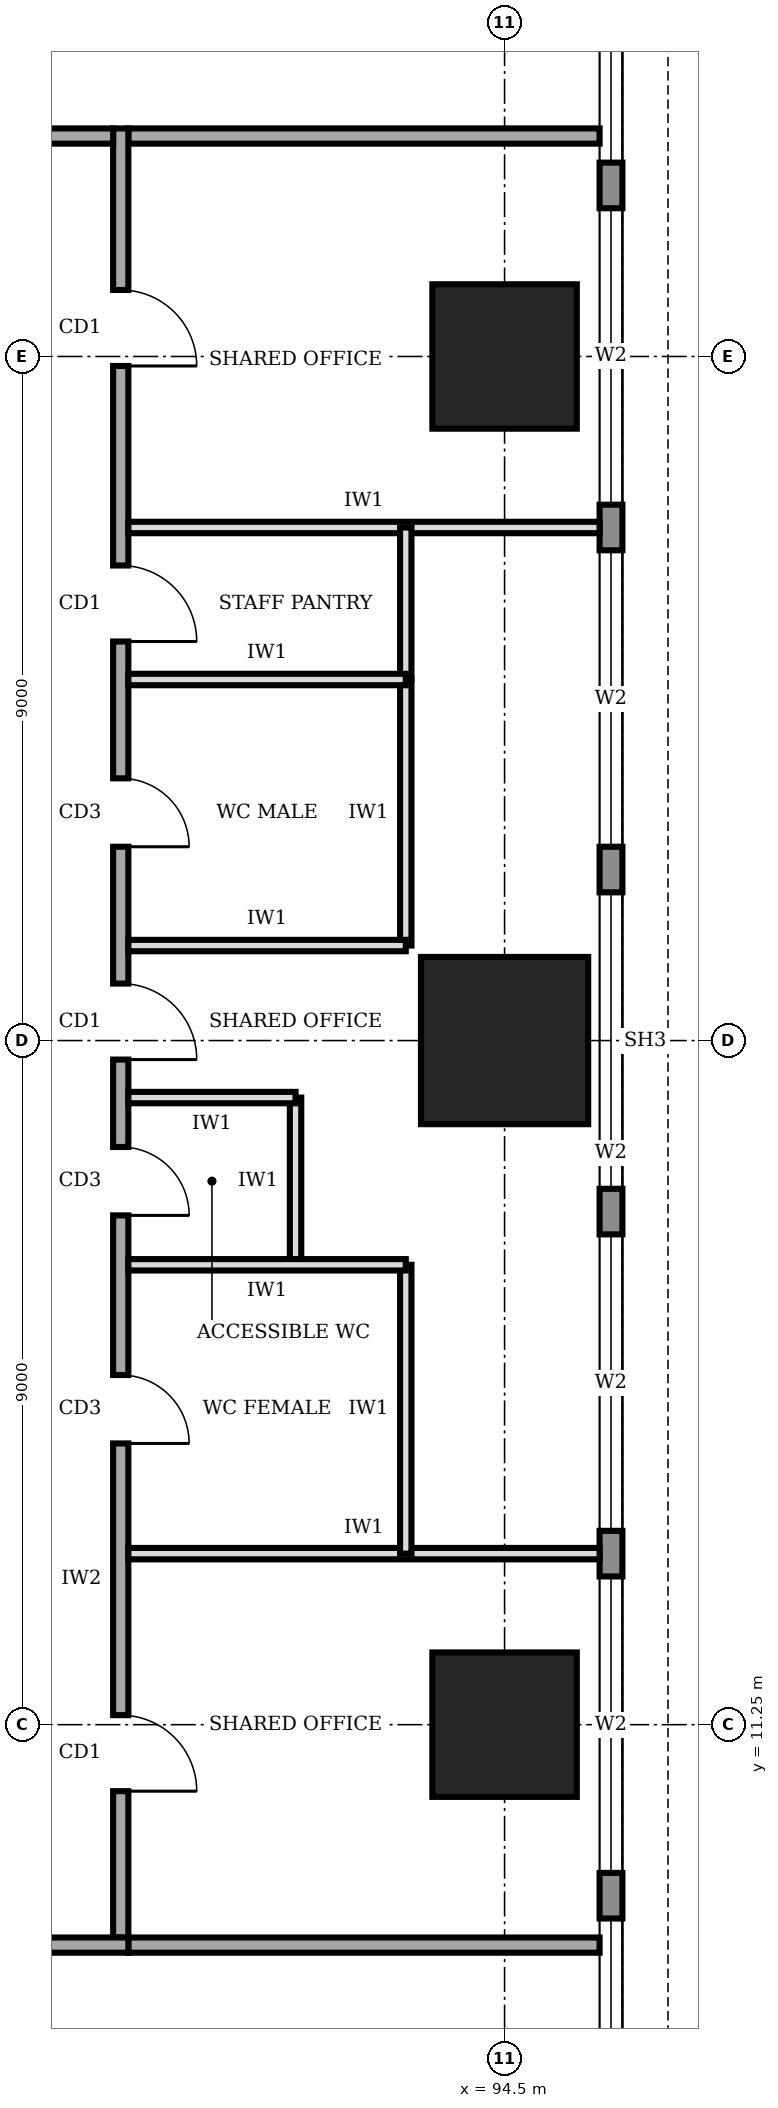
"""IFC4 building model, lengths in metres.
Left out: names, types, materials, properties, quantities, classifications, styles, units other than length and angle.
Written with IfcOpenShell. Run it as: python <this file> out.ifc"""

import sys

from ifc_helpers import new_model, si_unit, direction, frame, frame_2d, origin, origin_2d, place, context, subcontext, project, spatial, rectangle, extrude, element, fill, save


model = new_model("IFC4")
c1 = context("Model", 3, precision=1e-05, world=origin(), true_north=direction((0.0, 1.0)))
c2 = subcontext(c1, "Body", "Model", "MODEL_VIEW")
j1 = project(units=[si_unit("LENGTHUNIT", "METRE"), si_unit("PLANEANGLEUNIT", "RADIAN")], contexts=[c1])
p1 = place(None, origin())
s1 = spatial("IfcSite", under=j1, at=p1, CompositionType="ELEMENT")
p2 = place(p1, origin())
s2 = spatial("IfcBuilding", under=s1, at=p2, CompositionType="ELEMENT")
p3 = place(p2, frame((0.0, 0.0, 157.0)))
s3 = spatial("IfcBuildingStorey", under=s2, at=p3, CompositionType="ELEMENT", Elevation=157.0)
p4 = place(p3, frame((94.5, 11.25, 0.0), z_axis=(0.0, 0.0, 1.0), x_axis=(1.0, 0.0, 0.0)))
e1 = element("IfcColumn", 1, at=p4, inside=s3, PredefinedType="COLUMN", context=c2, shape_type="SweptSolid", body=[
    extrude(rectangle(XDim=1.9, YDim=1.9, at=origin_2d()), origin(), (0.0, 0.0, 1.0), 4.0),
])
p5 = place(p3, frame((94.5, 20.25, 0.0), z_axis=(0.0, 0.0, 1.0), x_axis=(1.0, 0.0, 0.0)))
e2 = element("IfcColumn", 2, at=p5, inside=s3, PredefinedType="COLUMN", context=c2, shape_type="SweptSolid", body=[
    extrude(rectangle(XDim=2.2, YDim=2.2, at=origin_2d()), origin(), (0.0, 0.0, 1.0), 4.0),
])
p6 = place(p3, frame((94.5, 29.25, 0.0), z_axis=(0.0, 0.0, 1.0), x_axis=(1.0, 0.0, 0.0)))
e3 = element("IfcColumn", 3, at=p6, inside=s3, PredefinedType="COLUMN", context=c2, shape_type="SweptSolid", body=[
    extrude(rectangle(XDim=1.9, YDim=1.9, at=origin_2d()), origin(), (0.0, 0.0, 1.0), 4.0),
])
p7 = place(p3, frame((95.9, 3.32, 0.0), z_axis=(0.0, 0.0, 1.0), x_axis=(0.0, 1.0, 0.0)))
e4 = element("IfcWall", 4, at=p7, inside=s3, PredefinedType="STANDARD", context=c2, shape_type="SweptSolid", body=[
    extrude(rectangle(XDim=33.86, YDim=0.3, at=frame_2d((16.93, 0.0))), origin(), (0.0, 0.0, 1.0), 3.75),
])
p8 = place(p7, frame((1.48, 0.0, 0.6)))
e5 = element("IfcOpeningElement", 5, at=p8, cuts=e4, PredefinedType="OPENING", context=c2, shape_type="SweptSolid", body=[
    extrude(rectangle(XDim=3.9, YDim=2.6, at=frame_2d((1.95, 1.3))), frame((0.0, 0.16, 0.0), z_axis=(0.0, -1.0, 0.0), x_axis=(1.0, 0.0, 0.0)), (0.0, 0.0, 1.0), 0.32),
])
p9 = place(p7, frame((5.98, 0.0, 0.6)))
e6 = element("IfcOpeningElement", 6, at=p9, cuts=e4, PredefinedType="OPENING", context=c2, shape_type="SweptSolid", body=[
    extrude(rectangle(XDim=3.9, YDim=2.6, at=frame_2d((1.95, 1.3))), frame((0.0, 0.16, 0.0), z_axis=(0.0, -1.0, 0.0), x_axis=(1.0, 0.0, 0.0)), (0.0, 0.0, 1.0), 0.32),
])
p10 = place(p7, frame((10.48, 0.0, 0.6)))
e7 = element("IfcOpeningElement", 7, at=p10, cuts=e4, PredefinedType="OPENING", context=c2, shape_type="SweptSolid", body=[
    extrude(rectangle(XDim=3.9, YDim=2.6, at=frame_2d((1.95, 1.3))), frame((0.0, 0.16, 0.0), z_axis=(0.0, -1.0, 0.0), x_axis=(1.0, 0.0, 0.0)), (0.0, 0.0, 1.0), 0.32),
])
p11 = place(p7, frame((14.98, 0.0, 0.6)))
e8 = element("IfcOpeningElement", 8, at=p11, cuts=e4, PredefinedType="OPENING", context=c2, shape_type="SweptSolid", body=[
    extrude(rectangle(XDim=3.9, YDim=2.6, at=frame_2d((1.95, 1.3))), frame((0.0, 0.16, 0.0), z_axis=(0.0, -1.0, 0.0), x_axis=(1.0, 0.0, 0.0)), (0.0, 0.0, 1.0), 0.32),
])
p12 = place(p7, frame((19.48, 0.0, 0.6)))
e9 = element("IfcOpeningElement", 9, at=p12, cuts=e4, PredefinedType="OPENING", context=c2, shape_type="SweptSolid", body=[
    extrude(rectangle(XDim=3.9, YDim=2.6, at=frame_2d((1.95, 1.3))), frame((0.0, 0.16, 0.0), z_axis=(0.0, -1.0, 0.0), x_axis=(1.0, 0.0, 0.0)), (0.0, 0.0, 1.0), 0.32),
])
p13 = place(p7, frame((23.98, 0.0, 0.6)))
e10 = element("IfcOpeningElement", 10, at=p13, cuts=e4, PredefinedType="OPENING", context=c2, shape_type="SweptSolid", body=[
    extrude(rectangle(XDim=3.9, YDim=2.6, at=frame_2d((1.95, 1.3))), frame((0.0, 0.16, 0.0), z_axis=(0.0, -1.0, 0.0), x_axis=(1.0, 0.0, 0.0)), (0.0, 0.0, 1.0), 0.32),
])
p14 = place(p7, frame((28.48, 0.0, 0.6)))
e11 = element("IfcOpeningElement", 11, at=p14, cuts=e4, PredefinedType="OPENING", context=c2, shape_type="SweptSolid", body=[
    extrude(rectangle(XDim=3.9, YDim=2.6, at=frame_2d((1.95, 1.3))), frame((0.0, 0.16, 0.0), z_axis=(0.0, -1.0, 0.0), x_axis=(1.0, 0.0, 0.0)), (0.0, 0.0, 1.0), 0.32),
])
p15 = place(p3, frame((63.3, 8.35, 0.0), z_axis=(0.0, 0.0, 1.0), x_axis=(1.0, 0.0, 0.0)))
e12 = element("IfcWall", 12, at=p15, inside=s3, PredefinedType="SOLIDWALL", context=c2, shape_type="SweptSolid", body=[
    extrude(rectangle(XDim=26.25, YDim=0.2, at=frame_2d((13.125, 0.0))), origin(), (0.0, 0.0, 1.0), 3.75),
])
p16 = place(p15, frame((6.0, 0.0, 0.0)))
e13 = element("IfcOpeningElement", 13, at=p16, cuts=e12, PredefinedType="OPENING", context=c2, shape_type="SweptSolid", body=[
    extrude(rectangle(XDim=1.0, YDim=2.1, at=frame_2d((0.5, 1.05))), frame((0.0, 0.11, 0.0), z_axis=(0.0, -1.0, 0.0), x_axis=(1.0, 0.0, 0.0)), (0.0, 0.0, 1.0), 0.22),
])
p17 = place(p15, frame((19.325, 0.0, 0.0)))
e14 = element("IfcOpeningElement", 14, at=p17, cuts=e12, PredefinedType="OPENING", context=c2, shape_type="SweptSolid", body=[
    extrude(rectangle(XDim=1.0, YDim=2.1, at=frame_2d((0.5, 1.05))), frame((0.0, 0.11, 0.0), z_axis=(0.0, -1.0, 0.0), x_axis=(1.0, 0.0, 0.0)), (0.0, 0.0, 1.0), 0.22),
])
p18 = place(p3, frame((89.45, 8.45, 0.0), z_axis=(0.0, 0.0, 1.0), x_axis=(0.0, 1.0, 0.0)))
e15 = element("IfcWall", 15, at=p18, inside=s3, PredefinedType="SOLIDWALL", context=c2, shape_type="SweptSolid", body=[
    extrude(rectangle(XDim=23.8, YDim=0.2, at=frame_2d((11.9, 0.0))), origin(), (0.0, 0.0, 1.0), 3.75),
])
p19 = place(p18, frame((1.925, 0.0, 0.0)))
e16 = element("IfcOpeningElement", 16, at=p19, cuts=e15, PredefinedType="OPENING", context=c2, shape_type="SweptSolid", body=[
    extrude(rectangle(XDim=1.0, YDim=2.1, at=frame_2d((0.5, 1.05))), frame((0.0, 0.11, 0.0), z_axis=(0.0, -1.0, 0.0), x_axis=(1.0, 0.0, 0.0)), (0.0, 0.0, 1.0), 0.22),
])
p20 = place(p18, frame((6.5, 0.0, 0.0)))
e17 = element("IfcOpeningElement", 17, at=p20, cuts=e15, PredefinedType="OPENING", context=c2, shape_type="SweptSolid", body=[
    extrude(rectangle(XDim=0.9, YDim=2.1, at=frame_2d((0.45, 1.05))), frame((0.0, 0.11, 0.0), z_axis=(0.0, -1.0, 0.0), x_axis=(1.0, 0.0, 0.0)), (0.0, 0.0, 1.0), 0.22),
])
p21 = place(p18, frame((9.5, 0.0, 0.0)))
e18 = element("IfcOpeningElement", 18, at=p21, cuts=e15, PredefinedType="OPENING", context=c2, shape_type="SweptSolid", body=[
    extrude(rectangle(XDim=0.9, YDim=2.1, at=frame_2d((0.45, 1.05))), frame((0.0, 0.11, 0.0), z_axis=(0.0, -1.0, 0.0), x_axis=(1.0, 0.0, 0.0)), (0.0, 0.0, 1.0), 0.22),
])
p22 = place(p18, frame((14.35, 0.0, 0.0)))
e19 = element("IfcOpeningElement", 19, at=p22, cuts=e15, PredefinedType="OPENING", context=c2, shape_type="SweptSolid", body=[
    extrude(rectangle(XDim=0.9, YDim=2.1, at=frame_2d((0.45, 1.05))), frame((0.0, 0.11, 0.0), z_axis=(0.0, -1.0, 0.0), x_axis=(1.0, 0.0, 0.0)), (0.0, 0.0, 1.0), 0.22),
])
p23 = place(p18, frame((17.05, 0.0, 0.0)))
e20 = element("IfcOpeningElement", 20, at=p23, cuts=e15, PredefinedType="OPENING", context=c2, shape_type="SweptSolid", body=[
    extrude(rectangle(XDim=1.0, YDim=2.1, at=frame_2d((0.5, 1.05))), frame((0.0, 0.11, 0.0), z_axis=(0.0, -1.0, 0.0), x_axis=(1.0, 0.0, 0.0)), (0.0, 0.0, 1.0), 0.22),
])
p24 = place(p18, frame((11.55, 0.0, 0.0)))
e21 = element("IfcOpeningElement", 21, at=p24, cuts=e15, PredefinedType="OPENING", context=c2, shape_type="SweptSolid", body=[
    extrude(rectangle(XDim=1.0, YDim=2.1, at=frame_2d((0.5, 1.05))), frame((0.0, 0.11, 0.0), z_axis=(0.0, -1.0, 0.0), x_axis=(1.0, 0.0, 0.0)), (0.0, 0.0, 1.0), 0.22),
])
p25 = place(p18, frame((20.675, 0.0, 0.0)))
e22 = element("IfcOpeningElement", 22, at=p25, cuts=e15, PredefinedType="OPENING", context=c2, shape_type="SweptSolid", body=[
    extrude(rectangle(XDim=1.0, YDim=2.1, at=frame_2d((0.5, 1.05))), frame((0.0, 0.11, 0.0), z_axis=(0.0, -1.0, 0.0), x_axis=(1.0, 0.0, 0.0)), (0.0, 0.0, 1.0), 0.22),
])
p26 = place(p3, frame((89.35, 32.15, 0.0), z_axis=(0.0, 0.0, 1.0), x_axis=(-1.0, 0.0, 0.0)))
e23 = element("IfcWall", 23, at=p26, inside=s3, PredefinedType="SOLIDWALL", context=c2, shape_type="SweptSolid", body=[
    extrude(rectangle(XDim=26.05, YDim=0.2, at=frame_2d((13.025, 0.0))), origin(), (0.0, 0.0, 1.0), 3.75),
])
p27 = place(p26, frame((16.4, 0.0, 0.0)))
e24 = element("IfcOpeningElement", 24, at=p27, cuts=e23, PredefinedType="OPENING", context=c2, shape_type="SweptSolid", body=[
    extrude(rectangle(XDim=1.8, YDim=2.1, at=frame_2d((0.9, 1.05))), frame((0.0, 0.11, 0.0), z_axis=(0.0, -1.0, 0.0), x_axis=(1.0, 0.0, 0.0)), (0.0, 0.0, 1.0), 0.22),
])
p28 = place(p26, frame((5.6, 0.0, 0.0)))
e25 = element("IfcOpeningElement", 25, at=p28, cuts=e23, PredefinedType="OPENING", context=c2, shape_type="SweptSolid", body=[
    extrude(rectangle(XDim=1.0, YDim=2.1, at=frame_2d((0.5, 1.05))), frame((0.0, 0.11, 0.0), z_axis=(0.0, -1.0, 0.0), x_axis=(1.0, 0.0, 0.0)), (0.0, 0.0, 1.0), 0.22),
])
p29 = place(p26, frame((1.325, 0.0, 0.0)))
e26 = element("IfcOpeningElement", 26, at=p29, cuts=e23, PredefinedType="OPENING", context=c2, shape_type="SweptSolid", body=[
    extrude(rectangle(XDim=1.0, YDim=2.1, at=frame_2d((0.5, 1.05))), frame((0.0, 0.11, 0.0), z_axis=(0.0, -1.0, 0.0), x_axis=(1.0, 0.0, 0.0)), (0.0, 0.0, 1.0), 0.22),
])
for number, where, z_axis, x_axis in (
    (27, (89.55, 8.35, 0.0), (0.0, 0.0, 1.0), (1.0, 0.0, 0.0)),
    (28, (89.55, 32.15, 0.0), (0.0, 0.0, 1.0), (1.0, 0.0, 0.0)),
):
    element("IfcWall", number, at=place(p3, frame(where, z_axis=z_axis, x_axis=x_axis)), inside=s3, PredefinedType="SOLIDWALL", context=c2, shape_type="SweptSolid", body=[
        extrude(rectangle(XDim=6.2, YDim=0.2, at=frame_2d((3.1, 0.0))), origin(), (0.0, 0.0, 1.0), 3.75),
    ])
for number, where, z_axis, x_axis in (
    (29, (89.55, 13.5, 0.0), (0.0, 0.0, 1.0), (1.0, 0.0, 0.0)),
    (30, (89.55, 27.0, 0.0), (0.0, 0.0, 1.0), (1.0, 0.0, 0.0)),
):
    element("IfcWall", number, at=place(p3, frame(where, z_axis=z_axis, x_axis=x_axis)), inside=s3, PredefinedType="PARTITIONING", context=c2, shape_type="SweptSolid", body=[
        extrude(rectangle(XDim=6.2, YDim=0.15, at=frame_2d((3.1, 0.0))), origin(), (0.0, 0.0, 1.0), 3.75),
    ])
p30 = place(p3, frame((89.55, 17.3, 0.0), z_axis=(0.0, 0.0, 1.0), x_axis=(1.0, 0.0, 0.0)))
e31 = element("IfcWall", 31, at=p30, inside=s3, PredefinedType="PARTITIONING", context=c2, shape_type="SweptSolid", body=[
    extrude(rectangle(XDim=3.65, YDim=0.15, at=frame_2d((1.825, 0.0))), origin(), (0.0, 0.0, 1.0), 3.75),
])
p31 = place(p3, frame((89.55, 19.5, 0.0), z_axis=(0.0, 0.0, 1.0), x_axis=(1.0, 0.0, 0.0)))
e32 = element("IfcWall", 32, at=p31, inside=s3, PredefinedType="PARTITIONING", context=c2, shape_type="SweptSolid", body=[
    extrude(rectangle(XDim=2.2, YDim=0.15, at=frame_2d((1.1, 0.0))), origin(), (0.0, 0.0, 1.0), 2.85),
])
for number, where, z_axis, x_axis in (
    (33, (89.55, 21.5, 0.0), (0.0, 0.0, 1.0), (1.0, 0.0, 0.0)),
    (34, (89.55, 25.0, 0.0), (0.0, 0.0, 1.0), (1.0, 0.0, 0.0)),
):
    element("IfcWall", number, at=place(p3, frame(where, z_axis=z_axis, x_axis=x_axis)), inside=s3, PredefinedType="PARTITIONING", context=c2, shape_type="SweptSolid", body=[
        extrude(rectangle(XDim=3.65, YDim=0.15, at=frame_2d((1.825, 0.0))), origin(), (0.0, 0.0, 1.0), 3.75),
    ])
p32 = place(p3, frame((93.2, 13.5, 0.0), z_axis=(0.0, 0.0, 1.0), x_axis=(0.0, 1.0, 0.0)))
e35 = element("IfcWall", 35, at=p32, inside=s3, PredefinedType="PARTITIONING", context=c2, shape_type="SweptSolid", body=[
    extrude(rectangle(XDim=3.8, YDim=0.15, at=frame_2d((1.9, 0.0))), origin(), (0.0, 0.0, 1.0), 3.75),
])
p33 = place(p3, frame((91.75, 17.3, 0.0), z_axis=(0.0, 0.0, 1.0), x_axis=(0.0, 1.0, 0.0)))
e36 = element("IfcWall", 36, at=p33, inside=s3, PredefinedType="PARTITIONING", context=c2, shape_type="SweptSolid", body=[
    extrude(rectangle(XDim=2.2, YDim=0.15, at=frame_2d((1.1, 0.0))), origin(), (0.0, 0.0, 1.0), 3.75),
])
p34 = place(p3, frame((93.2, 21.5, 0.0), z_axis=(0.0, 0.0, 1.0), x_axis=(0.0, 1.0, 0.0)))
e37 = element("IfcWall", 37, at=p34, inside=s3, PredefinedType="PARTITIONING", context=c2, shape_type="SweptSolid", body=[
    extrude(rectangle(XDim=3.5, YDim=0.15, at=frame_2d((1.75, 0.0))), origin(), (0.0, 0.0, 1.0), 3.75),
])
p35 = place(p3, frame((93.2, 25.0, 0.0), z_axis=(0.0, 0.0, 1.0), x_axis=(0.0, 1.0, 0.0)))
e38 = element("IfcWall", 38, at=p35, inside=s3, PredefinedType="PARTITIONING", context=c2, shape_type="SweptSolid", body=[
    extrude(rectangle(XDim=2.0, YDim=0.15, at=frame_2d((1.0, 0.0))), origin(), (0.0, 0.0, 1.0), 3.75),
])
p36 = place(p8, origin())
e39 = element("IfcWindow", 39, at=p36, inside=s3, PartitioningType="SINGLE_PANEL", PredefinedType="WINDOW", context=c2, shape_type="SweptSolid", body=[
    extrude(rectangle(XDim=3.9, YDim=2.6, at=frame_2d((1.95, 1.3))), frame((0.0, 0.03, 0.0), z_axis=(0.0, -1.0, 0.0), x_axis=(1.0, 0.0, 0.0)), (0.0, 0.0, 1.0), 0.06),
])
fill(e5, e39)
p37 = place(p9, origin())
e40 = element("IfcWindow", 40, at=p37, inside=s3, PartitioningType="SINGLE_PANEL", PredefinedType="WINDOW", context=c2, shape_type="SweptSolid", body=[
    extrude(rectangle(XDim=3.9, YDim=2.6, at=frame_2d((1.95, 1.3))), frame((0.0, 0.03, 0.0), z_axis=(0.0, -1.0, 0.0), x_axis=(1.0, 0.0, 0.0)), (0.0, 0.0, 1.0), 0.06),
])
fill(e6, e40)
p38 = place(p10, origin())
e41 = element("IfcWindow", 41, at=p38, inside=s3, PartitioningType="SINGLE_PANEL", PredefinedType="WINDOW", context=c2, shape_type="SweptSolid", body=[
    extrude(rectangle(XDim=3.9, YDim=2.6, at=frame_2d((1.95, 1.3))), frame((0.0, 0.03, 0.0), z_axis=(0.0, -1.0, 0.0), x_axis=(1.0, 0.0, 0.0)), (0.0, 0.0, 1.0), 0.06),
])
fill(e7, e41)
p39 = place(p11, origin())
e42 = element("IfcWindow", 42, at=p39, inside=s3, PartitioningType="SINGLE_PANEL", PredefinedType="WINDOW", context=c2, shape_type="SweptSolid", body=[
    extrude(rectangle(XDim=3.9, YDim=2.6, at=frame_2d((1.95, 1.3))), frame((0.0, 0.03, 0.0), z_axis=(0.0, -1.0, 0.0), x_axis=(1.0, 0.0, 0.0)), (0.0, 0.0, 1.0), 0.06),
])
fill(e8, e42)
p40 = place(p12, origin())
e43 = element("IfcWindow", 43, at=p40, inside=s3, PartitioningType="SINGLE_PANEL", PredefinedType="WINDOW", context=c2, shape_type="SweptSolid", body=[
    extrude(rectangle(XDim=3.9, YDim=2.6, at=frame_2d((1.95, 1.3))), frame((0.0, 0.03, 0.0), z_axis=(0.0, -1.0, 0.0), x_axis=(1.0, 0.0, 0.0)), (0.0, 0.0, 1.0), 0.06),
])
fill(e9, e43)
p41 = place(p13, origin())
e44 = element("IfcWindow", 44, at=p41, inside=s3, PartitioningType="SINGLE_PANEL", PredefinedType="WINDOW", context=c2, shape_type="SweptSolid", body=[
    extrude(rectangle(XDim=3.9, YDim=2.6, at=frame_2d((1.95, 1.3))), frame((0.0, 0.03, 0.0), z_axis=(0.0, -1.0, 0.0), x_axis=(1.0, 0.0, 0.0)), (0.0, 0.0, 1.0), 0.06),
])
fill(e10, e44)
p42 = place(p14, origin())
e45 = element("IfcWindow", 45, at=p42, inside=s3, PartitioningType="SINGLE_PANEL", PredefinedType="WINDOW", context=c2, shape_type="SweptSolid", body=[
    extrude(rectangle(XDim=3.9, YDim=2.6, at=frame_2d((1.95, 1.3))), frame((0.0, 0.03, 0.0), z_axis=(0.0, -1.0, 0.0), x_axis=(1.0, 0.0, 0.0)), (0.0, 0.0, 1.0), 0.06),
])
fill(e11, e45)
p43 = place(p19, frame((1.0, 0.0, 0.0), z_axis=(0.0, 0.0, 1.0), x_axis=(-1.0, 0.0, 0.0)))
e46 = element("IfcDoor", 46, at=p43, inside=s3, OperationType="SINGLE_SWING_RIGHT", PredefinedType="DOOR", context=c2, shape_type="SweptSolid", body=[
    extrude(rectangle(XDim=1.0, YDim=2.1, at=frame_2d((0.5, 1.05))), frame((0.0, 0.025, 0.0), z_axis=(0.0, -1.0, 0.0), x_axis=(1.0, 0.0, 0.0)), (0.0, 0.0, 1.0), 0.05),
])
fill(e16, e46)
p44 = place(p20, frame((0.9, 0.0, 0.0), z_axis=(0.0, 0.0, 1.0), x_axis=(-1.0, 0.0, 0.0)))
e47 = element("IfcDoor", 47, at=p44, inside=s3, OperationType="SINGLE_SWING_RIGHT", PredefinedType="DOOR", context=c2, shape_type="SweptSolid", body=[
    extrude(rectangle(XDim=0.9, YDim=2.1, at=frame_2d((0.45, 1.05))), frame((0.0, 0.025, 0.0), z_axis=(0.0, -1.0, 0.0), x_axis=(1.0, 0.0, 0.0)), (0.0, 0.0, 1.0), 0.05),
])
fill(e17, e47)
p45 = place(p21, frame((0.9, 0.0, 0.0), z_axis=(0.0, 0.0, 1.0), x_axis=(-1.0, 0.0, 0.0)))
e48 = element("IfcDoor", 48, at=p45, inside=s3, OperationType="SINGLE_SWING_RIGHT", PredefinedType="DOOR", context=c2, shape_type="SweptSolid", body=[
    extrude(rectangle(XDim=0.9, YDim=2.1, at=frame_2d((0.45, 1.05))), frame((0.0, 0.025, 0.0), z_axis=(0.0, -1.0, 0.0), x_axis=(1.0, 0.0, 0.0)), (0.0, 0.0, 1.0), 0.05),
])
fill(e18, e48)
p46 = place(p22, frame((0.9, 0.0, 0.0), z_axis=(0.0, 0.0, 1.0), x_axis=(-1.0, 0.0, 0.0)))
e49 = element("IfcDoor", 49, at=p46, inside=s3, OperationType="SINGLE_SWING_RIGHT", PredefinedType="DOOR", context=c2, shape_type="SweptSolid", body=[
    extrude(rectangle(XDim=0.9, YDim=2.1, at=frame_2d((0.45, 1.05))), frame((0.0, 0.025, 0.0), z_axis=(0.0, -1.0, 0.0), x_axis=(1.0, 0.0, 0.0)), (0.0, 0.0, 1.0), 0.05),
])
fill(e19, e49)
p47 = place(p23, frame((1.0, 0.0, 0.0), z_axis=(0.0, 0.0, 1.0), x_axis=(-1.0, 0.0, 0.0)))
e50 = element("IfcDoor", 50, at=p47, inside=s3, OperationType="SINGLE_SWING_RIGHT", PredefinedType="DOOR", context=c2, shape_type="SweptSolid", body=[
    extrude(rectangle(XDim=1.0, YDim=2.1, at=frame_2d((0.5, 1.05))), frame((0.0, 0.025, 0.0), z_axis=(0.0, -1.0, 0.0), x_axis=(1.0, 0.0, 0.0)), (0.0, 0.0, 1.0), 0.05),
])
fill(e20, e50)
p48 = place(p24, frame((1.0, 0.0, 0.0), z_axis=(0.0, 0.0, 1.0), x_axis=(-1.0, 0.0, 0.0)))
e51 = element("IfcDoor", 51, at=p48, inside=s3, OperationType="SINGLE_SWING_RIGHT", PredefinedType="DOOR", context=c2, shape_type="SweptSolid", body=[
    extrude(rectangle(XDim=1.0, YDim=2.1, at=frame_2d((0.5, 1.05))), frame((0.0, 0.025, 0.0), z_axis=(0.0, -1.0, 0.0), x_axis=(1.0, 0.0, 0.0)), (0.0, 0.0, 1.0), 0.05),
])
fill(e21, e51)
p49 = place(p25, frame((1.0, 0.0, 0.0), z_axis=(0.0, 0.0, 1.0), x_axis=(-1.0, 0.0, 0.0)))
e52 = element("IfcDoor", 52, at=p49, inside=s3, OperationType="SINGLE_SWING_RIGHT", PredefinedType="DOOR", context=c2, shape_type="SweptSolid", body=[
    extrude(rectangle(XDim=1.0, YDim=2.1, at=frame_2d((0.5, 1.05))), frame((0.0, 0.025, 0.0), z_axis=(0.0, -1.0, 0.0), x_axis=(1.0, 0.0, 0.0)), (0.0, 0.0, 1.0), 0.05),
])
fill(e22, e52)
save(model, sys.argv[1])
